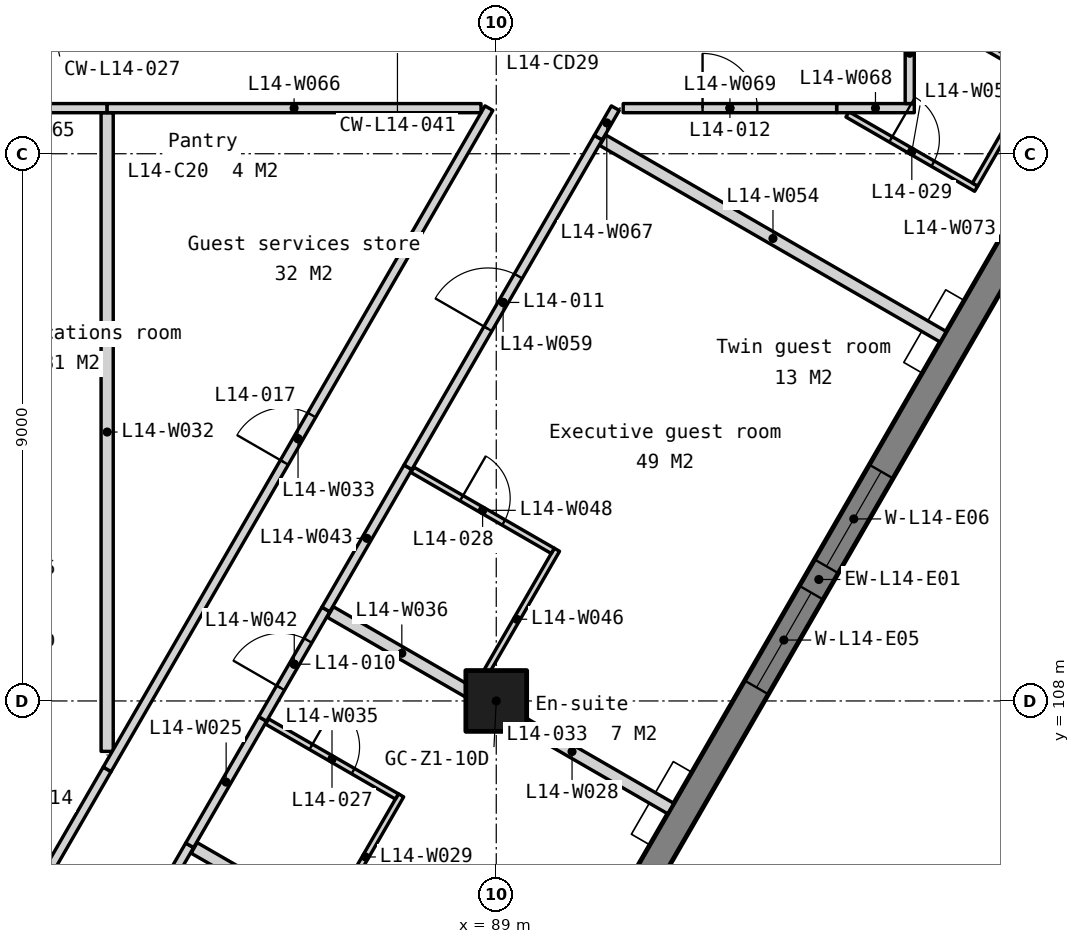
"""IFC4 building model, lengths in metres.
Left out: names, types, materials, properties, quantities, classifications, styles, units other than length and angle.
Written with IfcOpenShell. Run it as: python <this file> out.ifc"""

import sys

from ifc_helpers import new_model, si_unit, direction, frame, frame_2d, origin, origin_2d, place, context, subcontext, project, spatial, polyline, rectangle, outline, extrude, element, fill, save


model = new_model("IFC4")
c1 = context("Model", 3, precision=1e-05, world=origin(), true_north=direction((0.0, 1.0)))
c2 = subcontext(c1, "Body", "Model", "MODEL_VIEW")
j1 = project(units=[si_unit("LENGTHUNIT", "METRE"), si_unit("PLANEANGLEUNIT", "RADIAN")], contexts=[c1])
p1 = place(None, origin())
s1 = spatial("IfcSite", under=j1, at=p1, CompositionType="ELEMENT")
p2 = place(p1, origin())
s2 = spatial("IfcBuilding", under=s1, at=p2, CompositionType="ELEMENT")
p3 = place(p2, frame((0.0, 0.0, 63.0)))
s3 = spatial("IfcBuildingStorey", under=s2, at=p3, CompositionType="ELEMENT", Elevation=63.0)
p4 = place(p3, frame((89.0, 108.0, 0.0), z_axis=(0.0, 0.0, 1.0), x_axis=(1.0, 0.0, 0.0)))
e1 = element("IfcColumn", 1, at=p4, inside=s3, PredefinedType="COLUMN", context=c2, shape_type="SweptSolid", body=[
    extrude(rectangle(XDim=1.0, YDim=1.0, at=origin_2d()), origin(), (0.0, 0.0, 1.0), 3.5),
])
p5 = place(p3, frame((83.105, 90.599, -0.15), z_axis=(0.0, 0.0, 1.0), x_axis=(0.499999201451, 0.866025864826, 0.0)))
e2 = element("IfcWall", 2, at=p5, inside=s3, PredefinedType="SOLIDWALL", context=c2, shape_type="SweptSolid", body=[
    extrude(outline(polyline([(44.8, 0.0), (44.8, 3.5), (0.0, 3.5), (0.0, 0.0), (44.8, 0.0)])), frame((0.0, 0.225, 0.0), z_axis=(0.0, -1.0, 0.0), x_axis=(1.0, 0.0, 0.0)), (0.0, 0.0, 1.0), 0.45),
])
p6 = place(p5, frame((2.43, 0.0, 1.05)))
e3 = element("IfcOpeningElement", 3, at=p6, cuts=e2, PredefinedType="OPENING", context=c2, shape_type="SweptSolid", body=[
    extrude(rectangle(XDim=1.8, YDim=1.5, at=frame_2d((0.9, 0.75))), frame((0.0, 0.235, 0.0), z_axis=(0.0, -1.0, 0.0), x_axis=(1.0, 0.0, 0.0)), (0.0, 0.0, 1.0), 0.47),
])
p7 = place(p5, frame((4.73, 0.0, 1.05)))
e4 = element("IfcOpeningElement", 4, at=p7, cuts=e2, PredefinedType="OPENING", context=c2, shape_type="SweptSolid", body=[
    extrude(rectangle(XDim=1.8, YDim=1.5, at=frame_2d((0.9, 0.75))), frame((0.0, 0.235, 0.0), z_axis=(0.0, -1.0, 0.0), x_axis=(1.0, 0.0, 0.0)), (0.0, 0.0, 1.0), 0.47),
])
p8 = place(p5, frame((11.39, 0.0, 1.05)))
e5 = element("IfcOpeningElement", 5, at=p8, cuts=e2, PredefinedType="OPENING", context=c2, shape_type="SweptSolid", body=[
    extrude(rectangle(XDim=1.8, YDim=1.5, at=frame_2d((0.9, 0.75))), frame((0.0, 0.235, 0.0), z_axis=(0.0, -1.0, 0.0), x_axis=(1.0, 0.0, 0.0)), (0.0, 0.0, 1.0), 0.47),
])
p9 = place(p5, frame((13.69, 0.0, 1.05)))
e6 = element("IfcOpeningElement", 6, at=p9, cuts=e2, PredefinedType="OPENING", context=c2, shape_type="SweptSolid", body=[
    extrude(rectangle(XDim=1.8, YDim=1.5, at=frame_2d((0.9, 0.75))), frame((0.0, 0.235, 0.0), z_axis=(0.0, -1.0, 0.0), x_axis=(1.0, 0.0, 0.0)), (0.0, 0.0, 1.0), 0.47),
])
p10 = place(p5, frame((20.35, 0.0, 1.05)))
e7 = element("IfcOpeningElement", 7, at=p10, cuts=e2, PredefinedType="OPENING", context=c2, shape_type="SweptSolid", body=[
    extrude(rectangle(XDim=1.8, YDim=1.5, at=frame_2d((0.9, 0.75))), frame((0.0, 0.235, 0.0), z_axis=(0.0, -1.0, 0.0), x_axis=(1.0, 0.0, 0.0)), (0.0, 0.0, 1.0), 0.47),
])
p11 = place(p5, frame((22.65, 0.0, 1.05)))
e8 = element("IfcOpeningElement", 8, at=p11, cuts=e2, PredefinedType="OPENING", context=c2, shape_type="SweptSolid", body=[
    extrude(rectangle(XDim=1.8, YDim=1.5, at=frame_2d((0.9, 0.75))), frame((0.0, 0.235, 0.0), z_axis=(0.0, -1.0, 0.0), x_axis=(1.0, 0.0, 0.0)), (0.0, 0.0, 1.0), 0.47),
])
p12 = place(p5, frame((29.31, 0.0, 1.05)))
e9 = element("IfcOpeningElement", 9, at=p12, cuts=e2, PredefinedType="OPENING", context=c2, shape_type="SweptSolid", body=[
    extrude(rectangle(XDim=1.8, YDim=1.5, at=frame_2d((0.9, 0.75))), frame((0.0, 0.235, 0.0), z_axis=(0.0, -1.0, 0.0), x_axis=(1.0, 0.0, 0.0)), (0.0, 0.0, 1.0), 0.47),
])
p13 = place(p5, frame((31.61, 0.0, 1.05)))
e10 = element("IfcOpeningElement", 10, at=p13, cuts=e2, PredefinedType="OPENING", context=c2, shape_type="SweptSolid", body=[
    extrude(rectangle(XDim=1.8, YDim=1.5, at=frame_2d((0.9, 0.75))), frame((0.0, 0.235, 0.0), z_axis=(0.0, -1.0, 0.0), x_axis=(1.0, 0.0, 0.0)), (0.0, 0.0, 1.0), 0.47),
])
p14 = place(p5, frame((38.27, 0.0, 1.05)))
e11 = element("IfcOpeningElement", 11, at=p14, cuts=e2, PredefinedType="OPENING", context=c2, shape_type="SweptSolid", body=[
    extrude(rectangle(XDim=1.8, YDim=1.5, at=frame_2d((0.9, 0.75))), frame((0.0, 0.235, 0.0), z_axis=(0.0, -1.0, 0.0), x_axis=(1.0, 0.0, 0.0)), (0.0, 0.0, 1.0), 0.47),
])
p15 = place(p5, frame((40.57, 0.0, 1.05)))
e12 = element("IfcOpeningElement", 12, at=p15, cuts=e2, PredefinedType="OPENING", context=c2, shape_type="SweptSolid", body=[
    extrude(rectangle(XDim=1.8, YDim=1.5, at=frame_2d((0.9, 0.75))), frame((0.0, 0.235, 0.0), z_axis=(0.0, -1.0, 0.0), x_axis=(1.0, 0.0, 0.0)), (0.0, 0.0, 1.0), 0.47),
])
p16 = place(p3, frame((84.031, 105.583, 0.0), z_axis=(0.0, 0.0, 1.0), x_axis=(0.866015162859, -0.500017737384, 0.0)))
e13 = element("IfcWall", 13, at=p16, inside=s3, PredefinedType="PARTITIONING", context=c2, shape_type="SweptSolid", body=[
    extrude(rectangle(XDim=6.465, YDim=0.2, at=frame_2d((3.232, 0.0))), origin(), (0.0, 0.0, 1.0), 3.35),
])
p17 = place(p3, frame((79.95, 102.284, 0.0), z_axis=(0.0, 0.0, 1.0), x_axis=(0.500026712466, 0.866009980786, 0.0)))
e14 = element("IfcWall", 14, at=p17, inside=s3, PredefinedType="PARTITIONING", context=c2, shape_type="SweptSolid", body=[
    extrude(rectangle(XDim=5.302, YDim=0.15, at=frame_2d((2.651, 0.0))), origin(), (0.0, 0.0, 1.0), 3.35),
])
p18 = place(p17, frame((2.201, 0.0, 0.0)))
e15 = element("IfcOpeningElement", 15, at=p18, cuts=e14, PredefinedType="OPENING", context=c2, shape_type="SweptSolid", body=[
    extrude(rectangle(XDim=0.9, YDim=2.1, at=frame_2d((0.45, 1.05))), frame((0.0, 0.085, 0.0), z_axis=(0.0, -1.0, 0.0), x_axis=(1.0, 0.0, 0.0)), (0.0, 0.0, 1.0), 0.17),
])
p19 = place(p3, frame((80.775, 100.113, 0.0), z_axis=(0.0, 0.0, 1.0), x_axis=(0.5000079448, 0.866020816803, 0.0)))
e16 = element("IfcWall", 16, at=p19, inside=s3, PredefinedType="PARTITIONING", context=c2, shape_type="SweptSolid", body=[
    extrude(rectangle(XDim=6.366, YDim=0.15, at=frame_2d((3.183, 0.0))), origin(), (0.0, 0.0, 1.0), 3.35),
])
p20 = place(p19, frame((2.733, 0.0, 0.0)))
e17 = element("IfcOpeningElement", 17, at=p20, cuts=e16, PredefinedType="OPENING", context=c2, shape_type="SweptSolid", body=[
    extrude(rectangle(XDim=0.9, YDim=2.1, at=frame_2d((0.45, 1.05))), frame((0.0, 0.085, 0.0), z_axis=(0.0, -1.0, 0.0), x_axis=(1.0, 0.0, 0.0)), (0.0, 0.0, 1.0), 0.17),
])
p21 = place(p3, frame((83.958, 105.626, 0.0), z_axis=(0.0, 0.0, 1.0), x_axis=(0.500001309137, 0.866024647952, 0.0)))
e18 = element("IfcWall", 18, at=p21, inside=s3, PredefinedType="PARTITIONING", context=c2, shape_type="SweptSolid", body=[
    extrude(rectangle(XDim=2.4, YDim=0.15, at=frame_2d((1.2, 0.0))), origin(), (0.0, 0.0, 1.0), 3.35),
])
p22 = place(p3, frame((88.623, 108.105, 0.0), z_axis=(0.0, 0.0, 1.0), x_axis=(0.866022959057, -0.500004234368, 0.0)))
e19 = element("IfcWall", 19, at=p22, inside=s3, PredefinedType="PARTITIONING", context=c2, shape_type="SweptSolid", body=[
    extrude(rectangle(XDim=3.75, YDim=0.2, at=frame_2d((1.875, 0.0))), origin(), (0.0, 0.0, 1.0), 3.35),
])
p23 = place(p3, frame((86.264, 104.421, 0.0), z_axis=(0.0, 0.0, 1.0), x_axis=(0.500032503492, 0.866006637072, 0.0)))
e20 = element("IfcWall", 20, at=p23, inside=s3, PredefinedType="PARTITIONING", context=c2, shape_type="SweptSolid", body=[
    extrude(rectangle(XDim=2.34, YDim=0.1, at=frame_2d((1.17, 0.0))), origin(), (0.0, 0.0, 1.0), 3.35),
])
p24 = place(p3, frame((82.601, 107.171, 0.0), z_axis=(0.0, 0.0, 1.0), x_axis=(0.0, 1.0, 0.0)))
e21 = element("IfcWall", 21, at=p24, inside=s3, PredefinedType="PARTITIONING", context=c2, shape_type="SweptSolid", body=[
    extrude(rectangle(XDim=10.504, YDim=0.2, at=frame_2d((5.252, 0.0))), origin(), (0.0, 0.0, 1.0), 3.35),
])
p25 = place(p3, frame((82.601, 106.875, 0.0), z_axis=(0.0, 0.0, 1.0), x_axis=(0.499995104884, 0.866028229963, 0.0)))
e22 = element("IfcWall", 22, at=p25, inside=s3, PredefinedType="PARTITIONING", context=c2, shape_type="SweptSolid", body=[
    extrude(rectangle(XDim=12.557, YDim=0.15, at=frame_2d((6.278, 0.0))), origin(), (0.0, 0.0, 1.0), 3.35),
])
p26 = place(p25, frame((5.828, 0.0, 0.0)))
e23 = element("IfcOpeningElement", 23, at=p26, cuts=e22, PredefinedType="OPENING", context=c2, shape_type="SweptSolid", body=[
    extrude(rectangle(XDim=0.9, YDim=2.1, at=frame_2d((0.45, 1.05))), frame((0.0, 0.085, 0.0), z_axis=(0.0, -1.0, 0.0), x_axis=(1.0, 0.0, 0.0)), (0.0, 0.0, 1.0), 0.17),
])
p27 = place(p3, frame((85.231, 107.662, 0.0), z_axis=(0.0, 0.0, 1.0), x_axis=(0.866040446274, -0.499973944738, 0.0)))
e24 = element("IfcWall", 24, at=p27, inside=s3, PredefinedType="PARTITIONING", context=c2, shape_type="SweptSolid", body=[
    extrude(rectangle(XDim=2.465, YDim=0.1, at=frame_2d((1.232, 0.0))), origin(), (0.0, 0.0, 1.0), 3.35),
])
p28 = place(p27, frame((0.833, 0.0, 0.0)))
e25 = element("IfcOpeningElement", 25, at=p28, cuts=e24, PredefinedType="OPENING", context=c2, shape_type="SweptSolid", body=[
    extrude(rectangle(XDim=0.8, YDim=2.1, at=frame_2d((0.4, 1.05))), frame((0.0, 0.06, 0.0), z_axis=(0.0, -1.0, 0.0), x_axis=(1.0, 0.0, 0.0)), (0.0, 0.0, 1.0), 0.12),
])
p29 = place(p3, frame((86.271, 109.463, 0.0), z_axis=(0.0, 0.0, 1.0), x_axis=(0.866043331744, -0.499968946578, 0.0)))
e26 = element("IfcWall", 26, at=p29, inside=s3, PredefinedType="PARTITIONING", context=c2, shape_type="SweptSolid", body=[
    extrude(rectangle(XDim=2.715, YDim=0.2, at=frame_2d((1.357, 0.0))), origin(), (0.0, 0.0, 1.0), 3.35),
])
p30 = place(p3, frame((85.158, 107.704, 0.0), z_axis=(0.0, 0.0, 1.0), x_axis=(0.500027264788, 0.866009661879, 0.0)))
e27 = element("IfcWall", 27, at=p30, inside=s3, PredefinedType="PARTITIONING", context=c2, shape_type="SweptSolid", body=[
    extrude(rectangle(XDim=2.08, YDim=0.15, at=frame_2d((1.04, 0.0))), origin(), (0.0, 0.0, 1.0), 3.35),
])
p31 = place(p30, frame((0.59, 0.0, 0.0)))
e28 = element("IfcOpeningElement", 28, at=p31, cuts=e27, PredefinedType="OPENING", context=c2, shape_type="SweptSolid", body=[
    extrude(rectangle(XDim=0.9, YDim=2.1, at=frame_2d((0.45, 1.05))), frame((0.0, 0.085, 0.0), z_axis=(0.0, -1.0, 0.0), x_axis=(1.0, 0.0, 0.0)), (0.0, 0.0, 1.0), 0.17),
])
p32 = place(p3, frame((86.198, 109.505, 0.0), z_axis=(0.0, 0.0, 1.0), x_axis=(0.50000943426, 0.866019956843, 0.0)))
e29 = element("IfcWall", 29, at=p32, inside=s3, PredefinedType="PARTITIONING", context=c2, shape_type="SweptSolid", body=[
    extrude(rectangle(XDim=2.7, YDim=0.15, at=frame_2d((1.35, 0.0))), origin(), (0.0, 0.0, 1.0), 3.35),
])
p33 = place(p3, frame((88.678, 108.201, 0.0), z_axis=(0.0, 0.0, 1.0), x_axis=(0.500007957085, 0.86602080971, 0.0)))
e30 = element("IfcWall", 30, at=p33, inside=s3, PredefinedType="PARTITIONING", context=c2, shape_type="SweptSolid", body=[
    extrude(rectangle(XDim=2.64, YDim=0.1, at=frame_2d((1.32, 0.0))), origin(), (0.0, 0.0, 1.0), 3.35),
])
p34 = place(p3, frame((87.621, 111.801, 0.0), z_axis=(0.0, 0.0, 1.0), x_axis=(0.866036091453, -0.499981487958, 0.0)))
e31 = element("IfcWall", 31, at=p34, inside=s3, PredefinedType="PARTITIONING", context=c2, shape_type="SweptSolid", body=[
    extrude(rectangle(XDim=2.665, YDim=0.1, at=frame_2d((1.333, 0.0))), origin(), (0.0, 0.0, 1.0), 3.35),
])
p35 = place(p34, frame((0.933, 0.0, 0.0)))
e32 = element("IfcOpeningElement", 32, at=p35, cuts=e31, PredefinedType="OPENING", context=c2, shape_type="SweptSolid", body=[
    extrude(rectangle(XDim=0.8, YDim=2.1, at=frame_2d((0.4, 1.05))), frame((0.0, 0.06, 0.0), z_axis=(0.0, -1.0, 0.0), x_axis=(1.0, 0.0, 0.0)), (0.0, 0.0, 1.0), 0.12),
])
p36 = place(p3, frame((90.751, 117.223, 0.0), z_axis=(0.0, 0.0, 1.0), x_axis=(0.866015162859, -0.500017737384, 0.0)))
e33 = element("IfcWall", 33, at=p36, inside=s3, PredefinedType="PARTITIONING", context=c2, shape_type="SweptSolid", body=[
    extrude(rectangle(XDim=6.465, YDim=0.2, at=frame_2d((3.232, 0.0))), origin(), (0.0, 0.0, 1.0), 3.35),
])
p37 = place(p3, frame((94.775, 117.647, 0.0), z_axis=(0.0, 0.0, 1.0), x_axis=(0.86604092097, -0.499973122483, 0.0)))
e34 = element("IfcWall", 34, at=p37, inside=s3, PredefinedType="PARTITIONING", context=c2, shape_type="SweptSolid", body=[
    extrude(rectangle(XDim=2.445, YDim=0.1, at=frame_2d((1.223, 0.0))), origin(), (0.0, 0.0, 1.0), 3.35),
])
p38 = place(p37, frame((0.823, 0.0, 0.0)))
e35 = element("IfcOpeningElement", 35, at=p38, cuts=e34, PredefinedType="OPENING", context=c2, shape_type="SweptSolid", body=[
    extrude(rectangle(XDim=0.8, YDim=2.1, at=frame_2d((0.4, 1.05))), frame((0.0, 0.06, 0.0), z_axis=(0.0, -1.0, 0.0), x_axis=(1.0, 0.0, 0.0)), (0.0, 0.0, 1.0), 0.12),
])
p39 = place(p3, frame((87.548, 111.844, 0.0), z_axis=(0.0, 0.0, 1.0), x_axis=(0.499981277565, 0.866036212918, 0.0)))
e36 = element("IfcWall", 36, at=p39, inside=s3, PredefinedType="PARTITIONING", context=c2, shape_type="SweptSolid", body=[
    extrude(rectangle(XDim=6.26, YDim=0.15, at=frame_2d((3.13, 0.0))), origin(), (0.0, 0.0, 1.0), 3.35),
])
p40 = place(p39, frame((2.63, 0.0, 0.0)))
e37 = element("IfcOpeningElement", 37, at=p40, cuts=e36, PredefinedType="OPENING", context=c2, shape_type="SweptSolid", body=[
    extrude(rectangle(XDim=1.0, YDim=2.1, at=frame_2d((0.5, 1.05))), frame((0.0, 0.085, 0.0), z_axis=(0.0, -1.0, 0.0), x_axis=(1.0, 0.0, 0.0)), (0.0, 0.0, 1.0), 0.17),
])
p41 = place(p3, frame((80.0, 117.75, 0.0), z_axis=(0.0, 0.0, 1.0), x_axis=(1.0, 0.0, 0.0)))
e38 = element("IfcWall", 38, at=p41, inside=s3, PredefinedType="PARTITIONING", context=c2, shape_type="SweptSolid", body=[
    extrude(rectangle(XDim=2.601, YDim=0.15, at=frame_2d((1.301, 0.0))), origin(), (0.0, 0.0, 1.0), 3.35),
])
p42 = place(p3, frame((82.601, 117.75, 0.0), z_axis=(0.0, 0.0, 1.0), x_axis=(1.0, 0.0, 0.0)))
e39 = element("IfcWall", 39, at=p42, inside=s3, PredefinedType="PARTITIONING", context=c2, shape_type="SweptSolid", body=[
    extrude(rectangle(XDim=6.148, YDim=0.15, at=frame_2d((3.074, 0.0))), origin(), (0.0, 0.0, 1.0), 3.35),
])
p43 = place(p3, frame((90.678, 117.265, 0.0), z_axis=(0.0, 0.0, 1.0), x_axis=(0.50012503653, 0.865953201874, 0.0)))
e40 = element("IfcWall", 40, at=p43, inside=s3, PredefinedType="PARTITIONING", context=c2, shape_type="SweptSolid", body=[
    extrude(rectangle(XDim=0.56, YDim=0.15, at=frame_2d((0.28, 0.0))), origin(), (0.0, 0.0, 1.0), 3.35),
])
p44 = place(p3, frame((94.598, 117.75, 0.0), z_axis=(0.0, 0.0, 1.0), x_axis=(1.0, 0.0, 0.0)))
e41 = element("IfcWall", 41, at=p44, inside=s3, PredefinedType="PARTITIONING", context=c2, shape_type="SweptSolid", body=[
    extrude(rectangle(XDim=1.277, YDim=0.15, at=frame_2d((0.639, 0.0))), origin(), (0.0, 0.0, 1.0), 3.35),
])
p45 = place(p3, frame((91.088, 117.75, 0.0), z_axis=(0.0, 0.0, 1.0), x_axis=(1.0, 0.0, 0.0)))
e42 = element("IfcWall", 42, at=p45, inside=s3, PredefinedType="PARTITIONING", context=c2, shape_type="SweptSolid", body=[
    extrude(rectangle(XDim=3.51, YDim=0.15, at=frame_2d((1.755, 0.0))), origin(), (0.0, 0.0, 1.0), 3.35),
])
p46 = place(p45, frame((1.305, 0.0, 0.0)))
e43 = element("IfcOpeningElement", 43, at=p46, cuts=e42, PredefinedType="OPENING", context=c2, shape_type="SweptSolid", body=[
    extrude(rectangle(XDim=0.9, YDim=2.1, at=frame_2d((0.45, 1.05))), frame((0.0, 0.085, 0.0), z_axis=(0.0, -1.0, 0.0), x_axis=(1.0, 0.0, 0.0)), (0.0, 0.0, 1.0), 0.17),
])
p47 = place(p3, frame((95.8, 117.825, 0.0), z_axis=(0.0, 0.0, 1.0), x_axis=(0.0, 1.0, 0.0)))
e44 = element("IfcWall", 44, at=p47, inside=s3, PredefinedType="PARTITIONING", context=c2, shape_type="SweptSolid", body=[
    extrude(rectangle(XDim=1.656, YDim=0.15, at=frame_2d((0.828, 0.0))), origin(), (0.0, 0.0, 1.0), 3.35),
])
p48 = place(p3, frame((96.875, 116.493, 0.0), z_axis=(0.0, 0.0, 1.0), x_axis=(0.500043961785, 0.866000020948, 0.0)))
e45 = element("IfcWall", 45, at=p48, inside=s3, PredefinedType="PARTITIONING", context=c2, shape_type="SweptSolid", body=[
    extrude(rectangle(XDim=1.95, YDim=0.1, at=frame_2d((0.975, 0.0))), origin(), (0.0, 0.0, 1.0), 3.35),
])
p49 = place(p3, frame((95.882, 119.433, 0.0), z_axis=(0.0, 0.0, 1.0), x_axis=(0.866009305107, -0.50002788269, 0.0)))
e46 = element("IfcWall", 46, at=p49, inside=s3, PredefinedType="PARTITIONING", context=c2, shape_type="SweptSolid", body=[
    extrude(rectangle(XDim=2.329, YDim=0.1, at=frame_2d((1.165, 0.0))), origin(), (0.0, 0.0, 1.0), 3.35),
])
p50 = place(p10, origin())
e47 = element("IfcWindow", 47, at=p50, inside=s3, PartitioningType="SINGLE_PANEL", PredefinedType="WINDOW", context=c2, shape_type="SweptSolid", body=[
    extrude(rectangle(XDim=1.8, YDim=1.5, at=frame_2d((0.9, 0.75))), frame((0.0, 0.03, 0.0), z_axis=(0.0, -1.0, 0.0), x_axis=(1.0, 0.0, 0.0)), (0.0, 0.0, 1.0), 0.06),
])
fill(e7, e47)
p51 = place(p11, origin())
e48 = element("IfcWindow", 48, at=p51, inside=s3, PartitioningType="SINGLE_PANEL", PredefinedType="WINDOW", context=c2, shape_type="SweptSolid", body=[
    extrude(rectangle(XDim=1.8, YDim=1.5, at=frame_2d((0.9, 0.75))), frame((0.0, 0.03, 0.0), z_axis=(0.0, -1.0, 0.0), x_axis=(1.0, 0.0, 0.0)), (0.0, 0.0, 1.0), 0.06),
])
fill(e8, e48)
p52 = place(p31, origin())
e49 = element("IfcDoor", 49, at=p52, inside=s3, OperationType="SINGLE_SWING_LEFT", PredefinedType="DOOR", context=c2, shape_type="SweptSolid", body=[
    extrude(rectangle(XDim=0.9, YDim=2.1, at=frame_2d((0.45, 1.05))), frame((0.0, 0.025, 0.0), z_axis=(0.0, -1.0, 0.0), x_axis=(1.0, 0.0, 0.0)), (0.0, 0.0, 1.0), 0.05),
])
fill(e28, e49)
p53 = place(p40, origin())
e50 = element("IfcDoor", 50, at=p53, inside=s3, OperationType="SINGLE_SWING_LEFT", PredefinedType="DOOR", context=c2, shape_type="SweptSolid", body=[
    extrude(rectangle(XDim=1.0, YDim=2.1, at=frame_2d((0.5, 1.05))), frame((0.0, 0.025, 0.0), z_axis=(0.0, -1.0, 0.0), x_axis=(1.0, 0.0, 0.0)), (0.0, 0.0, 1.0), 0.05),
])
fill(e37, e50)
p54 = place(p46, origin())
e51 = element("IfcDoor", 51, at=p54, inside=s3, OperationType="SINGLE_SWING_LEFT", PredefinedType="DOOR", context=c2, shape_type="SweptSolid", body=[
    extrude(rectangle(XDim=0.9, YDim=2.1, at=frame_2d((0.45, 1.05))), frame((0.0, 0.025, 0.0), z_axis=(0.0, -1.0, 0.0), x_axis=(1.0, 0.0, 0.0)), (0.0, 0.0, 1.0), 0.05),
])
fill(e43, e51)
p55 = place(p26, origin())
e52 = element("IfcDoor", 52, at=p55, inside=s3, OperationType="SINGLE_SWING_LEFT", PredefinedType="DOOR", context=c2, shape_type="SweptSolid", body=[
    extrude(rectangle(XDim=0.9, YDim=2.1, at=frame_2d((0.45, 1.05))), frame((0.0, 0.025, 0.0), z_axis=(0.0, -1.0, 0.0), x_axis=(1.0, 0.0, 0.0)), (0.0, 0.0, 1.0), 0.05),
])
fill(e23, e52)
p56 = place(p28, origin())
e53 = element("IfcDoor", 53, at=p56, inside=s3, OperationType="SINGLE_SWING_LEFT", PredefinedType="DOOR", context=c2, shape_type="SweptSolid", body=[
    extrude(rectangle(XDim=0.8, YDim=2.1, at=frame_2d((0.4, 1.05))), frame((0.0, 0.025, 0.0), z_axis=(0.0, -1.0, 0.0), x_axis=(1.0, 0.0, 0.0)), (0.0, 0.0, 1.0), 0.05),
])
fill(e25, e53)
p57 = place(p35, origin())
e54 = element("IfcDoor", 54, at=p57, inside=s3, OperationType="SINGLE_SWING_LEFT", PredefinedType="DOOR", context=c2, shape_type="SweptSolid", body=[
    extrude(rectangle(XDim=0.8, YDim=2.1, at=frame_2d((0.4, 1.05))), frame((0.0, 0.025, 0.0), z_axis=(0.0, -1.0, 0.0), x_axis=(1.0, 0.0, 0.0)), (0.0, 0.0, 1.0), 0.05),
])
fill(e32, e54)
p58 = place(p38, origin())
e55 = element("IfcDoor", 55, at=p58, inside=s3, OperationType="SINGLE_SWING_LEFT", PredefinedType="DOOR", context=c2, shape_type="SweptSolid", body=[
    extrude(rectangle(XDim=0.8, YDim=2.1, at=frame_2d((0.4, 1.05))), frame((0.0, 0.025, 0.0), z_axis=(0.0, -1.0, 0.0), x_axis=(1.0, 0.0, 0.0)), (0.0, 0.0, 1.0), 0.05),
])
fill(e35, e55)
save(model, sys.argv[1])
